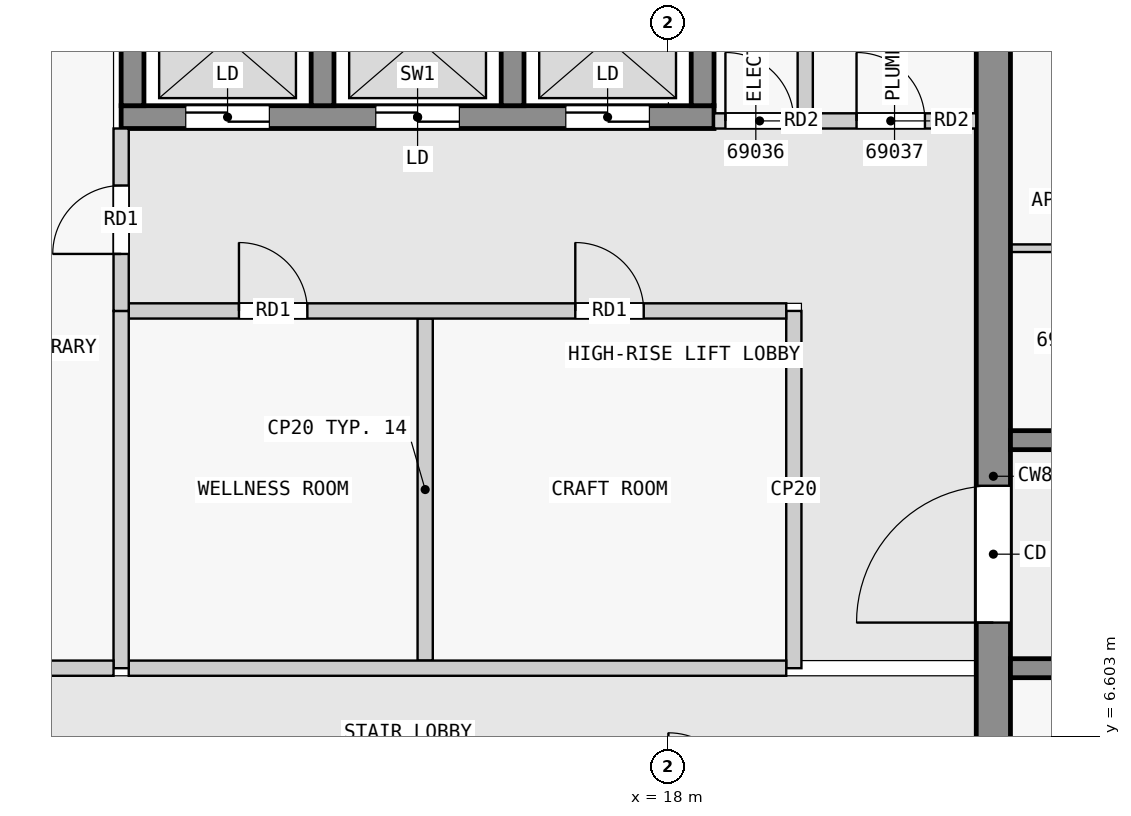
"""IFC4 building model, lengths in metres.
Left out: names, types, materials, properties, quantities, classifications, styles, units other than length and angle.
Written with IfcOpenShell. Run it as: python <this file> out.ifc"""

import sys

from ifc_helpers import new_model, si_unit, direction, frame, frame_2d, origin, place, context, subcontext, project, spatial, rectangle, extrude, element, fill, save


model = new_model("IFC4")
c1 = context("Model", 3, precision=1e-05, world=origin(), true_north=direction((0.0, 1.0)))
c2 = subcontext(c1, "Body", "Model", "MODEL_VIEW")
j1 = project(units=[si_unit("LENGTHUNIT", "METRE"), si_unit("PLANEANGLEUNIT", "RADIAN")], contexts=[c1])
p1 = place(None, origin())
s1 = spatial("IfcSite", under=j1, at=p1, CompositionType="ELEMENT")
p2 = place(p1, origin())
s2 = spatial("IfcBuilding", under=s1, at=p2, CompositionType="ELEMENT")
p3 = place(p2, frame((0.0, 0.0, 263.4)))
s3 = spatial("IfcBuildingStorey", under=s2, at=p3, CompositionType="ELEMENT", Elevation=263.4)
p4 = place(p3, frame((22.275, 2.5, 0.0), z_axis=(0.0, 0.0, 1.0), x_axis=(0.0, 1.0, 0.0)))
e1 = element("IfcWall", 1, at=p4, inside=s3, PredefinedType="SHEAR", context=c2, shape_type="SweptSolid", body=[
    extrude(rectangle(XDim=15.05, YDim=0.45, at=frame_2d((7.525, 0.0))), origin(), (0.0, 0.0, 1.0), 3.25),
])
p5 = place(p4, frame((5.6, 0.0, 0.0)))
e2 = element("IfcOpeningElement", 2, at=p5, cuts=e1, PredefinedType="OPENING", context=c2, shape_type="SweptSolid", body=[
    extrude(rectangle(XDim=1.8, YDim=2.1, at=frame_2d((0.9, 1.05))), frame((0.0, 0.235, 0.0), z_axis=(0.0, -1.0, 0.0), x_axis=(1.0, 0.0, 0.0)), (0.0, 0.0, 1.0), 0.47),
])
p6 = place(p3, frame((10.8, 14.75, 0.0), z_axis=(0.0, 0.0, 1.0), x_axis=(1.0, 0.0, 0.0)))
e3 = element("IfcWall", 3, at=p6, inside=s3, PredefinedType="SHEAR", context=c2, shape_type="SweptSolid", body=[
    extrude(rectangle(XDim=7.8, YDim=0.3, at=frame_2d((3.9, 0.0))), origin(), (0.0, 0.0, 1.0), 3.25),
])
p7 = place(p6, frame((0.85, 0.0, 0.0)))
e4 = element("IfcOpeningElement", 4, at=p7, cuts=e3, PredefinedType="OPENING", context=c2, shape_type="SweptSolid", body=[
    extrude(rectangle(XDim=1.1, YDim=2.1, at=frame_2d((0.55, 1.05))), frame((0.0, 0.16, 0.0), z_axis=(0.0, -1.0, 0.0), x_axis=(1.0, 0.0, 0.0)), (0.0, 0.0, 1.0), 0.32),
])
p8 = place(p6, frame((3.35, 0.0, 0.0)))
e5 = element("IfcOpeningElement", 5, at=p8, cuts=e3, PredefinedType="OPENING", context=c2, shape_type="SweptSolid", body=[
    extrude(rectangle(XDim=1.1, YDim=2.1, at=frame_2d((0.55, 1.05))), frame((0.0, 0.16, 0.0), z_axis=(0.0, -1.0, 0.0), x_axis=(1.0, 0.0, 0.0)), (0.0, 0.0, 1.0), 0.32),
])
p9 = place(p6, frame((5.85, 0.0, 0.0)))
e6 = element("IfcOpeningElement", 6, at=p9, cuts=e3, PredefinedType="OPENING", context=c2, shape_type="SweptSolid", body=[
    extrude(rectangle(XDim=1.1, YDim=2.1, at=frame_2d((0.55, 1.05))), frame((0.0, 0.16, 0.0), z_axis=(0.0, -1.0, 0.0), x_axis=(1.0, 0.0, 0.0)), (0.0, 0.0, 1.0), 0.32),
])
for number, where, z_axis, x_axis in (
    (7, (10.95, 14.9, 0.0), (0.0, 0.0, 1.0), (0.0, 1.0, 0.0)),
    (8, (13.45, 14.9, 0.0), (0.0, 0.0, 1.0), (0.0, 1.0, 0.0)),
    (9, (15.95, 14.9, 0.0), (0.0, 0.0, 1.0), (0.0, 1.0, 0.0)),
    (10, (18.45, 14.9, 0.0), (0.0, 0.0, 1.0), (0.0, 1.0, 0.0)),
):
    element("IfcWall", number, at=place(p3, frame(where, z_axis=z_axis, x_axis=x_axis)), inside=s3, PredefinedType="SHEAR", context=c2, shape_type="SweptSolid", body=[
        extrude(rectangle(XDim=2.0, YDim=0.3, at=frame_2d((1.0, 0.0))), origin(), (0.0, 0.0, 1.0), 3.25),
    ])
p10 = place(p3, frame((22.5, 7.5, 0.0), z_axis=(0.0, 0.0, 1.0), x_axis=(1.0, 0.0, 0.0)))
e11 = element("IfcWall", 11, at=p10, inside=s3, PredefinedType="SHEAR", context=c2, shape_type="SweptSolid", body=[
    extrude(rectangle(XDim=22.5, YDim=0.25, at=frame_2d((11.25, 0.0))), origin(), (0.0, 0.0, 1.0), 3.25),
])
p11 = place(p10, frame((1.75, 0.0, 0.0)))
e12 = element("IfcOpeningElement", 12, at=p11, cuts=e11, PredefinedType="OPENING", context=c2, shape_type="SweptSolid", body=[
    extrude(rectangle(XDim=1.0, YDim=2.1, at=frame_2d((0.5, 1.05))), frame((0.0, 0.135, 0.0), z_axis=(0.0, -1.0, 0.0), x_axis=(1.0, 0.0, 0.0)), (0.0, 0.0, 1.0), 0.27),
])
p12 = place(p10, frame((6.25, 0.0, 0.0)))
e13 = element("IfcOpeningElement", 13, at=p12, cuts=e11, PredefinedType="OPENING", context=c2, shape_type="SweptSolid", body=[
    extrude(rectangle(XDim=1.0, YDim=2.1, at=frame_2d((0.5, 1.05))), frame((0.0, 0.135, 0.0), z_axis=(0.0, -1.0, 0.0), x_axis=(1.0, 0.0, 0.0)), (0.0, 0.0, 1.0), 0.27),
])
p13 = place(p10, frame((10.35, 0.0, 0.0)))
e14 = element("IfcOpeningElement", 14, at=p13, cuts=e11, PredefinedType="OPENING", context=c2, shape_type="SweptSolid", body=[
    extrude(rectangle(XDim=1.8, YDim=2.1, at=frame_2d((0.9, 1.05))), frame((0.0, 0.135, 0.0), z_axis=(0.0, -1.0, 0.0), x_axis=(1.0, 0.0, 0.0)), (0.0, 0.0, 1.0), 0.27),
])
p14 = place(p10, frame((15.25, 0.0, 0.0)))
e15 = element("IfcOpeningElement", 15, at=p14, cuts=e11, PredefinedType="OPENING", context=c2, shape_type="SweptSolid", body=[
    extrude(rectangle(XDim=1.0, YDim=2.1, at=frame_2d((0.5, 1.05))), frame((0.0, 0.135, 0.0), z_axis=(0.0, -1.0, 0.0), x_axis=(1.0, 0.0, 0.0)), (0.0, 0.0, 1.0), 0.27),
])
p15 = place(p10, frame((18.75, 0.0, 0.0)))
e16 = element("IfcOpeningElement", 16, at=p15, cuts=e11, PredefinedType="OPENING", context=c2, shape_type="SweptSolid", body=[
    extrude(rectangle(XDim=0.9, YDim=2.1, at=frame_2d((0.45, 1.05))), frame((0.0, 0.135, 0.0), z_axis=(0.0, -1.0, 0.0), x_axis=(1.0, 0.0, 0.0)), (0.0, 0.0, 1.0), 0.27),
])
p16 = place(p10, frame((20.95, 0.0, 0.0)))
e17 = element("IfcOpeningElement", 17, at=p16, cuts=e11, PredefinedType="OPENING", context=c2, shape_type="SweptSolid", body=[
    extrude(rectangle(XDim=1.0, YDim=2.1, at=frame_2d((0.5, 1.05))), frame((0.0, 0.135, 0.0), z_axis=(0.0, -1.0, 0.0), x_axis=(1.0, 0.0, 0.0)), (0.0, 0.0, 1.0), 0.27),
])
p17 = place(p3, frame((22.5, 10.5, 0.0), z_axis=(0.0, 0.0, 1.0), x_axis=(1.0, 0.0, 0.0)))
e18 = element("IfcWall", 18, at=p17, inside=s3, PredefinedType="SHEAR", context=c2, shape_type="SweptSolid", body=[
    extrude(rectangle(XDim=22.5, YDim=0.25, at=frame_2d((11.25, 0.0))), origin(), (0.0, 0.0, 1.0), 3.25),
])
p18 = place(p17, frame((1.75, 0.0, 0.0)))
e19 = element("IfcOpeningElement", 19, at=p18, cuts=e18, PredefinedType="OPENING", context=c2, shape_type="SweptSolid", body=[
    extrude(rectangle(XDim=1.0, YDim=2.1, at=frame_2d((0.5, 1.05))), frame((0.0, 0.135, 0.0), z_axis=(0.0, -1.0, 0.0), x_axis=(1.0, 0.0, 0.0)), (0.0, 0.0, 1.0), 0.27),
])
p19 = place(p17, frame((8.55, 0.0, 0.0)))
e20 = element("IfcOpeningElement", 20, at=p19, cuts=e18, PredefinedType="OPENING", context=c2, shape_type="SweptSolid", body=[
    extrude(rectangle(XDim=1.0, YDim=2.1, at=frame_2d((0.5, 1.05))), frame((0.0, 0.135, 0.0), z_axis=(0.0, -1.0, 0.0), x_axis=(1.0, 0.0, 0.0)), (0.0, 0.0, 1.0), 0.27),
])
p20 = place(p17, frame((16.85, 0.0, 0.0)))
e21 = element("IfcOpeningElement", 21, at=p20, cuts=e18, PredefinedType="OPENING", context=c2, shape_type="SweptSolid", body=[
    extrude(rectangle(XDim=1.0, YDim=2.1, at=frame_2d((0.5, 1.05))), frame((0.0, 0.135, 0.0), z_axis=(0.0, -1.0, 0.0), x_axis=(1.0, 0.0, 0.0)), (0.0, 0.0, 1.0), 0.27),
])
p21 = place(p3, frame((7.1, 7.5, 0.0), z_axis=(0.0, 0.0, 1.0), x_axis=(1.0, 0.0, 0.0)))
e22 = element("IfcWall", 22, at=p21, inside=s3, PredefinedType="PARTITIONING", context=c2, shape_type="SweptSolid", body=[
    extrude(rectangle(XDim=3.6, YDim=0.2, at=frame_2d((1.8, 0.0))), origin(), (0.0, 0.0, 1.0), 3.25),
])
p22 = place(p3, frame((10.8, 12.2, 0.0), z_axis=(0.0, 0.0, 1.0), x_axis=(0.0, 1.0, 0.0)))
e23 = element("IfcWall", 23, at=p22, inside=s3, PredefinedType="PARTITIONING", context=c2, shape_type="SweptSolid", body=[
    extrude(rectangle(XDim=2.4, YDim=0.2, at=frame_2d((1.2, 0.0))), origin(), (0.0, 0.0, 1.0), 3.25),
])
p23 = place(p22, frame((0.75, 0.0, 0.0)))
e24 = element("IfcOpeningElement", 24, at=p23, cuts=e23, PredefinedType="OPENING", context=c2, shape_type="SweptSolid", body=[
    extrude(rectangle(XDim=0.9, YDim=2.1, at=frame_2d((0.45, 1.05))), frame((0.0, 0.11, 0.0), z_axis=(0.0, -1.0, 0.0), x_axis=(1.0, 0.0, 0.0)), (0.0, 0.0, 1.0), 0.22),
])
p24 = place(p3, frame((10.8, 7.5, 0.0), z_axis=(0.0, 0.0, 1.0), x_axis=(0.0, 1.0, 0.0)))
e25 = element("IfcWall", 25, at=p24, inside=s3, PredefinedType="PARTITIONING", context=c2, shape_type="SweptSolid", body=[
    extrude(rectangle(XDim=4.7, YDim=0.2, at=frame_2d((2.35, 0.0))), origin(), (0.0, 0.0, 1.0), 3.25),
])
p25 = place(p3, frame((10.9, 7.5, 0.0), z_axis=(0.0, 0.0, 1.0), x_axis=(1.0, 0.0, 0.0)))
e26 = element("IfcWall", 26, at=p25, inside=s3, PredefinedType="PARTITIONING", context=c2, shape_type="SweptSolid", body=[
    extrude(rectangle(XDim=8.65, YDim=0.2, at=frame_2d((4.325, 0.0))), origin(), (0.0, 0.0, 1.0), 3.25),
])
p26 = place(p3, frame((19.65, 7.5, 0.0), z_axis=(0.0, 0.0, 1.0), x_axis=(0.0, 1.0, 0.0)))
e27 = element("IfcWall", 27, at=p26, inside=s3, PredefinedType="PARTITIONING", context=c2, shape_type="SweptSolid", body=[
    extrude(rectangle(XDim=4.7, YDim=0.2, at=frame_2d((2.35, 0.0))), origin(), (0.0, 0.0, 1.0), 3.25),
])
p27 = place(p3, frame((10.9, 12.2, 0.0), z_axis=(0.0, 0.0, 1.0), x_axis=(1.0, 0.0, 0.0)))
e28 = element("IfcWall", 28, at=p27, inside=s3, PredefinedType="PARTITIONING", context=c2, shape_type="SweptSolid", body=[
    extrude(rectangle(XDim=8.65, YDim=0.2, at=frame_2d((4.325, 0.0))), origin(), (0.0, 0.0, 1.0), 3.25),
])
p28 = place(p27, frame((1.45, 0.0, 0.0)))
e29 = element("IfcOpeningElement", 29, at=p28, cuts=e28, PredefinedType="OPENING", context=c2, shape_type="SweptSolid", body=[
    extrude(rectangle(XDim=0.9, YDim=2.1, at=frame_2d((0.45, 1.05))), frame((0.0, 0.11, 0.0), z_axis=(0.0, -1.0, 0.0), x_axis=(1.0, 0.0, 0.0)), (0.0, 0.0, 1.0), 0.22),
])
p29 = place(p27, frame((5.875, 0.0, 0.0)))
e30 = element("IfcOpeningElement", 30, at=p29, cuts=e28, PredefinedType="OPENING", context=c2, shape_type="SweptSolid", body=[
    extrude(rectangle(XDim=0.9, YDim=2.1, at=frame_2d((0.45, 1.05))), frame((0.0, 0.11, 0.0), z_axis=(0.0, -1.0, 0.0), x_axis=(1.0, 0.0, 0.0)), (0.0, 0.0, 1.0), 0.22),
])
p30 = place(p3, frame((14.8, 7.6, 0.0), z_axis=(0.0, 0.0, 1.0), x_axis=(0.0, 1.0, 0.0)))
e31 = element("IfcWall", 31, at=p30, inside=s3, PredefinedType="PARTITIONING", context=c2, shape_type="SweptSolid", body=[
    extrude(rectangle(XDim=4.5, YDim=0.2, at=frame_2d((2.25, 0.0))), origin(), (0.0, 0.0, 1.0), 3.25),
])
p31 = place(p3, frame((18.6, 14.7, 0.0), z_axis=(0.0, 0.0, 1.0), x_axis=(1.0, 0.0, 0.0)))
e32 = element("IfcWall", 32, at=p31, inside=s3, PredefinedType="PARTITIONING", context=c2, shape_type="SweptSolid", body=[
    extrude(rectangle(XDim=3.45, YDim=0.2, at=frame_2d((1.725, 0.0))), origin(), (0.0, 0.0, 1.0), 3.25),
])
p32 = place(p31, frame((0.15, 0.0, 0.0)))
e33 = element("IfcOpeningElement", 33, at=p32, cuts=e32, PredefinedType="OPENING", context=c2, shape_type="SweptSolid", body=[
    extrude(rectangle(XDim=0.9, YDim=2.1, at=frame_2d((0.45, 1.05))), frame((0.0, 0.11, 0.0), z_axis=(0.0, -1.0, 0.0), x_axis=(1.0, 0.0, 0.0)), (0.0, 0.0, 1.0), 0.22),
])
p33 = place(p31, frame((1.875, 0.0, 0.0)))
e34 = element("IfcOpeningElement", 34, at=p33, cuts=e32, PredefinedType="OPENING", context=c2, shape_type="SweptSolid", body=[
    extrude(rectangle(XDim=0.9, YDim=2.1, at=frame_2d((0.45, 1.05))), frame((0.0, 0.11, 0.0), z_axis=(0.0, -1.0, 0.0), x_axis=(1.0, 0.0, 0.0)), (0.0, 0.0, 1.0), 0.22),
])
p34 = place(p3, frame((19.8, 14.8, 0.0), z_axis=(0.0, 0.0, 1.0), x_axis=(0.0, 1.0, 0.0)))
e35 = element("IfcWall", 35, at=p34, inside=s3, PredefinedType="PARTITIONING", context=c2, shape_type="SweptSolid", body=[
    extrude(rectangle(XDim=2.75, YDim=0.2, at=frame_2d((1.375, 0.0))), origin(), (0.0, 0.0, 1.0), 3.25),
])
p35 = place(p3, frame((23.95, 13.025, 0.0), z_axis=(0.0, 0.0, 1.0), x_axis=(-1.0, 0.0, 0.0)))
e36 = element("IfcWall", 36, at=p35, inside=s3, PredefinedType="PARTITIONING", context=c2, shape_type="SweptSolid", body=[
    extrude(rectangle(XDim=1.45, YDim=0.1, at=frame_2d((0.725, 0.0))), origin(), (0.0, 0.0, 1.0), 3.25),
])
p36 = place(p23, origin())
e37 = element("IfcDoor", 37, at=p36, inside=s3, OperationType="SINGLE_SWING_LEFT", PredefinedType="DOOR", context=c2, shape_type="SweptSolid", body=[
    extrude(rectangle(XDim=0.9, YDim=2.1, at=frame_2d((0.45, 1.05))), frame((0.0, 0.025, 0.0), z_axis=(0.0, -1.0, 0.0), x_axis=(1.0, 0.0, 0.0)), (0.0, 0.0, 1.0), 0.05),
])
fill(e24, e37)
p37 = place(p28, origin())
e38 = element("IfcDoor", 38, at=p37, inside=s3, OperationType="SINGLE_SWING_LEFT", PredefinedType="DOOR", context=c2, shape_type="SweptSolid", body=[
    extrude(rectangle(XDim=0.9, YDim=2.1, at=frame_2d((0.45, 1.05))), frame((0.0, 0.025, 0.0), z_axis=(0.0, -1.0, 0.0), x_axis=(1.0, 0.0, 0.0)), (0.0, 0.0, 1.0), 0.05),
])
fill(e29, e38)
p38 = place(p29, origin())
e39 = element("IfcDoor", 39, at=p38, inside=s3, OperationType="SINGLE_SWING_LEFT", PredefinedType="DOOR", context=c2, shape_type="SweptSolid", body=[
    extrude(rectangle(XDim=0.9, YDim=2.1, at=frame_2d((0.45, 1.05))), frame((0.0, 0.025, 0.0), z_axis=(0.0, -1.0, 0.0), x_axis=(1.0, 0.0, 0.0)), (0.0, 0.0, 1.0), 0.05),
])
fill(e30, e39)
p39 = place(p7, origin())
e40 = element("IfcDoor", 40, at=p39, inside=s3, OperationType="DOUBLE_DOOR_SLIDING", PredefinedType="DOOR", context=c2, shape_type="SweptSolid", body=[
    extrude(rectangle(XDim=1.1, YDim=2.1, at=frame_2d((0.55, 1.05))), frame((0.0, 0.025, 0.0), z_axis=(0.0, -1.0, 0.0), x_axis=(1.0, 0.0, 0.0)), (0.0, 0.0, 1.0), 0.05),
])
fill(e4, e40)
p40 = place(p8, origin())
e41 = element("IfcDoor", 41, at=p40, inside=s3, OperationType="DOUBLE_DOOR_SLIDING", PredefinedType="DOOR", context=c2, shape_type="SweptSolid", body=[
    extrude(rectangle(XDim=1.1, YDim=2.1, at=frame_2d((0.55, 1.05))), frame((0.0, 0.025, 0.0), z_axis=(0.0, -1.0, 0.0), x_axis=(1.0, 0.0, 0.0)), (0.0, 0.0, 1.0), 0.05),
])
fill(e5, e41)
p41 = place(p9, origin())
e42 = element("IfcDoor", 42, at=p41, inside=s3, OperationType="DOUBLE_DOOR_SLIDING", PredefinedType="DOOR", context=c2, shape_type="SweptSolid", body=[
    extrude(rectangle(XDim=1.1, YDim=2.1, at=frame_2d((0.55, 1.05))), frame((0.0, 0.025, 0.0), z_axis=(0.0, -1.0, 0.0), x_axis=(1.0, 0.0, 0.0)), (0.0, 0.0, 1.0), 0.05),
])
fill(e6, e42)
p42 = place(p5, origin())
e43 = element("IfcDoor", 43, at=p42, inside=s3, OperationType="DOUBLE_DOOR_SINGLE_SWING", PredefinedType="DOOR", context=c2, shape_type="SweptSolid", body=[
    extrude(rectangle(XDim=1.8, YDim=2.1, at=frame_2d((0.9, 1.05))), frame((0.0, 0.025, 0.0), z_axis=(0.0, -1.0, 0.0), x_axis=(1.0, 0.0, 0.0)), (0.0, 0.0, 1.0), 0.05),
])
fill(e2, e43)
p43 = place(p32, origin())
e44 = element("IfcDoor", 44, at=p43, inside=s3, OperationType="SINGLE_SWING_LEFT", PredefinedType="DOOR", context=c2, shape_type="SweptSolid", body=[
    extrude(rectangle(XDim=0.9, YDim=2.1, at=frame_2d((0.45, 1.05))), frame((0.0, 0.025, 0.0), z_axis=(0.0, -1.0, 0.0), x_axis=(1.0, 0.0, 0.0)), (0.0, 0.0, 1.0), 0.05),
])
fill(e33, e44)
p44 = place(p33, origin())
e45 = element("IfcDoor", 45, at=p44, inside=s3, OperationType="SINGLE_SWING_LEFT", PredefinedType="DOOR", context=c2, shape_type="SweptSolid", body=[
    extrude(rectangle(XDim=0.9, YDim=2.1, at=frame_2d((0.45, 1.05))), frame((0.0, 0.025, 0.0), z_axis=(0.0, -1.0, 0.0), x_axis=(1.0, 0.0, 0.0)), (0.0, 0.0, 1.0), 0.05),
])
fill(e34, e45)
save(model, sys.argv[1])
